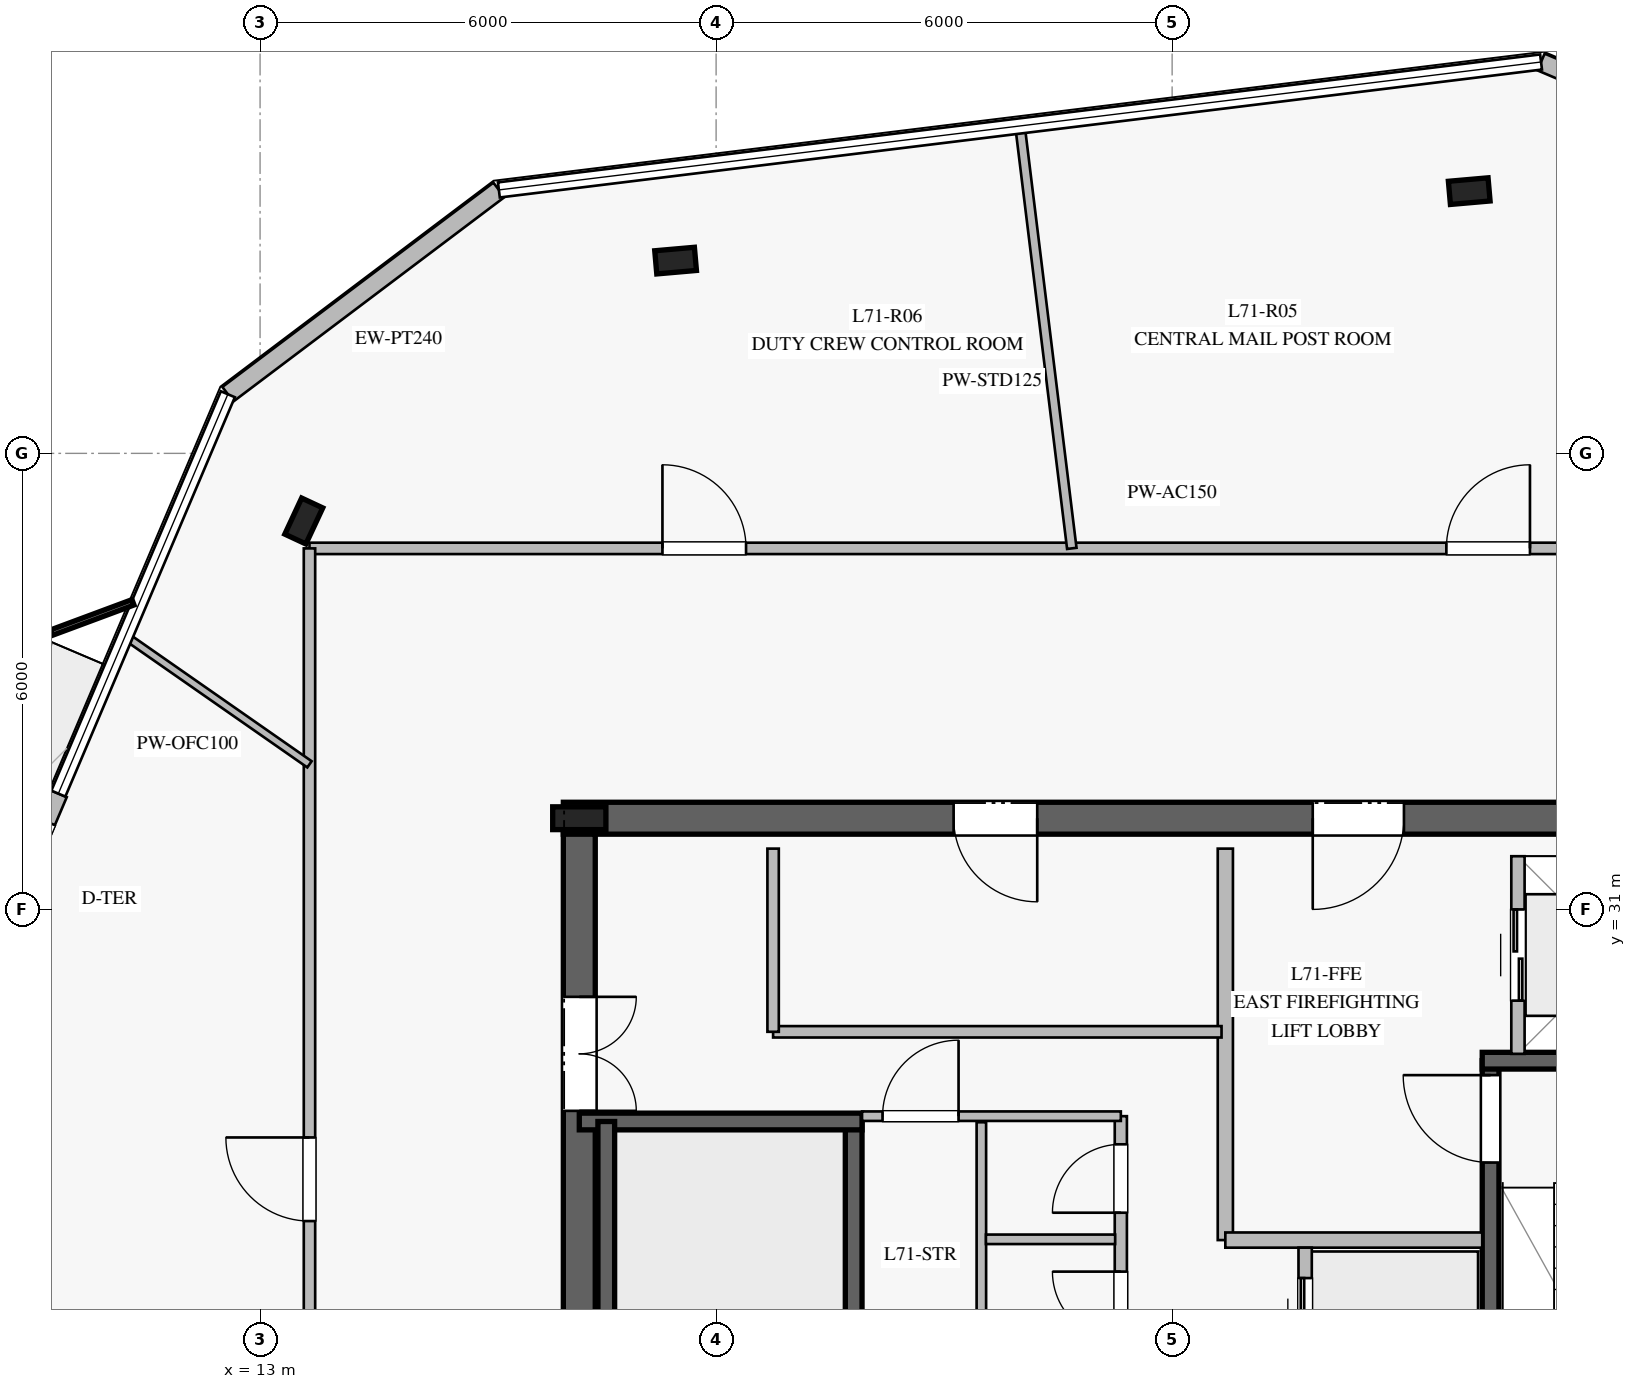
"""IFC4 building model, lengths in metres.
Left out: names, types, materials, properties, quantities, classifications, styles, units other than length and angle.
Written with IfcOpenShell. Run it as: python <this file> out.ifc"""

import sys

from ifc_helpers import new_model, si_unit, direction, frame, frame_2d, origin, origin_2d, place, context, subcontext, project, spatial, rectangle, i_section, extrude, element, fill, save


model = new_model("IFC4")
c1 = context("Model", 3, precision=1e-05, world=origin(), true_north=direction((0.0, 1.0)))
c2 = subcontext(c1, "Body", "Model", "MODEL_VIEW")
j1 = project(units=[si_unit("LENGTHUNIT", "METRE"), si_unit("PLANEANGLEUNIT", "RADIAN")], contexts=[c1])
p1 = place(None, origin())
s1 = spatial("IfcSite", under=j1, at=p1, CompositionType="ELEMENT")
p2 = place(p1, origin())
s2 = spatial("IfcBuilding", under=s1, at=p2, CompositionType="ELEMENT")
p3 = place(p2, frame((0.0, 0.0, 294.2)))
s3 = spatial("IfcBuildingStorey", under=s2, at=p3, CompositionType="ELEMENT", Elevation=294.2)
p4 = place(p3, frame((33.01, 32.2, 0.0), z_axis=(0.0, 0.0, 1.0), x_axis=(-1.0, 0.0, 0.0)))
e1 = element("IfcWall", 1, at=p4, inside=s3, PredefinedType="SHEAR", context=c2, shape_type="SweptSolid", body=[
    extrude(rectangle(XDim=16.02, YDim=0.42, at=frame_2d((8.01, 0.0))), origin(), (0.0, 0.0, 1.0), 3.78),
])
p5 = place(p4, frame((4.96, 0.0, 0.0)))
e2 = element("IfcOpeningElement", 2, at=p5, cuts=e1, PredefinedType="OPENING", context=c2, shape_type="SweptSolid", body=[
    extrude(rectangle(XDim=1.2, YDim=2.25, at=frame_2d((0.6, 1.125))), frame((0.0, 0.22, 0.0), z_axis=(0.0, -1.0, 0.0), x_axis=(1.0, 0.0, 0.0)), (0.0, 0.0, 1.0), 0.44),
])
p6 = place(p4, frame((9.785, 0.0, 0.0)))
e3 = element("IfcOpeningElement", 3, at=p6, cuts=e1, PredefinedType="OPENING", context=c2, shape_type="SweptSolid", body=[
    extrude(rectangle(XDim=1.1, YDim=2.2, at=frame_2d((0.55, 1.1))), frame((0.0, 0.22, 0.0), z_axis=(0.0, -1.0, 0.0), x_axis=(1.0, 0.0, 0.0)), (0.0, 0.0, 1.0), 0.44),
])
p7 = place(p3, frame((17.2, 31.99, 0.0), z_axis=(0.0, 0.0, 1.0), x_axis=(0.0, -1.0, 0.0)))
e4 = element("IfcWall", 4, at=p7, inside=s3, PredefinedType="SHEAR", context=c2, shape_type="SweptSolid", body=[
    extrude(rectangle(XDim=13.98, YDim=0.42, at=frame_2d((6.99, 0.0))), origin(), (0.0, 0.0, 1.0), 3.78),
])
p8 = place(p7, frame((2.14, 0.0, 0.0)))
e5 = element("IfcOpeningElement", 5, at=p8, cuts=e4, PredefinedType="OPENING", context=c2, shape_type="SweptSolid", body=[
    extrude(rectangle(XDim=1.5, YDim=2.2, at=frame_2d((0.75, 1.1))), frame((0.0, 0.22, 0.0), z_axis=(0.0, -1.0, 0.0), x_axis=(1.0, 0.0, 0.0)), (0.0, 0.0, 1.0), 0.44),
])
p9 = place(p3, frame((17.2, 32.2, 0.0), z_axis=(0.0, 0.0, 1.0), x_axis=(1.0, 0.0, 0.0)))
e6 = element("IfcColumn", 6, at=p9, inside=s3, PredefinedType="COLUMN", context=c2, shape_type="SweptSolid", body=[
    extrude(i_section(OverallWidth=0.3, OverallDepth=0.7, WebThickness=0.017, FlangeThickness=0.032, at=origin_2d()), origin(), (0.0, 0.0, 1.0), 4.0),
])
p10 = place(p3, frame((20.81, 20.99, 0.0), z_axis=(0.0, 0.0, 1.0), x_axis=(0.0, 1.0, 0.0)))
e7 = element("IfcWall", 7, at=p10, inside=s3, PredefinedType="SOLIDWALL", context=c2, shape_type="SweptSolid", body=[
    extrude(rectangle(XDim=7.22, YDim=0.22, at=frame_2d((3.61, 0.0))), origin(), (0.0, 0.0, 1.0), 3.78),
])
p11 = place(p10, frame((0.18, 0.0, 0.0)))
e8 = element("IfcOpeningElement", 8, at=p11, cuts=e7, PredefinedType="OPENING", context=c2, shape_type="SweptSolid", body=[
    extrude(rectangle(XDim=1.15, YDim=2.2, at=frame_2d((0.575, 1.1))), frame((0.0, 0.12, 0.0), z_axis=(0.0, -1.0, 0.0), x_axis=(1.0, 0.0, 0.0)), (0.0, 0.0, 1.0), 0.24),
])
p12 = place(p3, frame((17.2, 28.21, 0.0), z_axis=(0.0, 0.0, 1.0), x_axis=(1.0, 0.0, 0.0)))
e9 = element("IfcWall", 9, at=p12, inside=s3, PredefinedType="SOLIDWALL", context=c2, shape_type="SweptSolid", body=[
    extrude(rectangle(XDim=3.72, YDim=0.22, at=frame_2d((1.86, 0.0))), origin(), (0.0, 0.0, 1.0), 3.78),
])
p13 = place(p3, frame((17.555, 28.21, 0.0), z_axis=(0.0, 0.0, 1.0), x_axis=(0.0, -1.0, 0.0)))
e10 = element("IfcWall", 10, at=p13, inside=s3, PredefinedType="SOLIDWALL", context=c2, shape_type="SweptSolid", body=[
    extrude(rectangle(XDim=7.22, YDim=0.22, at=frame_2d((3.61, 0.0))), origin(), (0.0, 0.0, 1.0), 3.78),
])
p14 = place(p3, frame((29.19, 21.79, 0.0), z_axis=(0.0, 0.0, 1.0), x_axis=(0.0, 1.0, 0.0)))
e11 = element("IfcWall", 11, at=p14, inside=s3, PredefinedType="SOLIDWALL", context=c2, shape_type="SweptSolid", body=[
    extrude(rectangle(XDim=7.22, YDim=0.22, at=frame_2d((3.61, 0.0))), origin(), (0.0, 0.0, 1.0), 3.78),
])
p15 = place(p14, frame((5.88, 0.0, 0.0)))
e12 = element("IfcOpeningElement", 12, at=p15, cuts=e11, PredefinedType="OPENING", context=c2, shape_type="SweptSolid", body=[
    extrude(rectangle(XDim=1.15, YDim=2.2, at=frame_2d((0.575, 1.1))), frame((0.0, 0.12, 0.0), z_axis=(0.0, -1.0, 0.0), x_axis=(1.0, 0.0, 0.0)), (0.0, 0.0, 1.0), 0.24),
])
p16 = place(p3, frame((29.08, 29.01, 0.0), z_axis=(0.0, 0.0, 1.0), x_axis=(1.0, 0.0, 0.0)))
e13 = element("IfcWall", 13, at=p16, inside=s3, PredefinedType="SOLIDWALL", context=c2, shape_type="SweptSolid", body=[
    extrude(rectangle(XDim=3.72, YDim=0.22, at=frame_2d((1.86, 0.0))), origin(), (0.0, 0.0, 1.0), 3.78),
])
for number, where, z_axis, x_axis in (
    (14, (28.909, 40.45, 0.0), (0.0, 0.0, 1.0), (0.996, 0.087, 0.0)),
    (15, (18.467, 39.536, 0.0), (0.0, 0.0, 1.0), (0.996, 0.087, 0.0)),
    (16, (13.575, 36.11, 0.0), (0.0, 0.0, 1.0), (0.423, 0.906, 0.0)),
):
    element("IfcColumn", number, at=place(p3, frame(where, z_axis=z_axis, x_axis=x_axis)), inside=s3, PredefinedType="COLUMN", context=c2, shape_type="SweptSolid", body=[
        extrude(i_section(OverallWidth=0.306, OverallDepth=0.524, WebThickness=0.021, FlangeThickness=0.04, at=origin_2d()), origin(), (0.0, 0.0, 1.0), 4.0),
    ])
p17 = place(p3, frame((16.142, 40.466, 0.0), z_axis=(0.0, 0.0, 1.0), x_axis=(-0.798560985543, -0.601913907772, 0.0)))
e17 = element("IfcWall", 17, at=p17, inside=s3, PredefinedType="STANDARD", context=c2, shape_type="SweptSolid", body=[
    extrude(rectangle(XDim=4.466, YDim=0.24, at=frame_2d((2.233, 0.0))), origin(), (0.0, 0.0, 1.0), 3.78),
])
p18 = place(p3, frame((10.346, 32.524, 0.0), z_axis=(0.0, 0.0, 1.0), x_axis=(-0.390847654615, -0.920455382342, 0.0)))
e18 = element("IfcWall", 18, at=p18, inside=s3, PredefinedType="STANDARD", context=c2, shape_type="SweptSolid", body=[
    extrude(rectangle(XDim=2.4, YDim=0.24, at=frame_2d((1.2, 0.0))), origin(), (0.0, 0.0, 1.0), 3.78),
])
p19 = place(p18, frame((0.4, 0.0, 0.0)))
e19 = element("IfcOpeningElement", 19, at=p19, cuts=e18, PredefinedType="OPENING", context=c2, shape_type="SweptSolid", body=[
    extrude(rectangle(XDim=1.6, YDim=2.25, at=frame_2d((0.8, 1.125))), frame((0.0, 0.13, 0.0), z_axis=(0.0, -1.0, 0.0), x_axis=(1.0, 0.0, 0.0)), (0.0, 0.0, 1.0), 0.26),
])
p20 = place(p3, frame((33.964, 40.404, 0.0), z_axis=(0.0, 0.0, 1.0), x_axis=(-0.92048584613, 0.390775903908, 0.0)))
e20 = element("IfcWall", 20, at=p20, inside=s3, PredefinedType="STANDARD", context=c2, shape_type="SweptSolid", body=[
    extrude(rectangle(XDim=4.465, YDim=0.24, at=frame_2d((2.232, 0.0))), origin(), (0.0, 0.0, 1.0), 3.78),
])
p21 = place(p3, frame((25.7, 26.65, 0.0), z_axis=(0.0, 0.0, 1.0), x_axis=(0.0, 1.0, 0.0)))
e21 = element("IfcWall", 21, at=p21, inside=s3, PredefinedType="PARTITIONING", context=c2, shape_type="SweptSolid", body=[
    extrude(rectangle(XDim=5.15, YDim=0.2, at=frame_2d((2.575, 0.0))), origin(), (0.0, 0.0, 1.0), 3.78),
])
p22 = place(p3, frame((25.7, 26.65, 0.0), z_axis=(0.0, 0.0, 1.0), x_axis=(1.0, 0.0, 0.0)))
e22 = element("IfcWall", 22, at=p22, inside=s3, PredefinedType="PARTITIONING", context=c2, shape_type="SweptSolid", body=[
    extrude(rectangle(XDim=3.38, YDim=0.2, at=frame_2d((1.69, 0.0))), origin(), (0.0, 0.0, 1.0), 3.78),
])
p23 = place(p3, frame((24.325, 23.35, 0.0), z_axis=(0.0, 0.0, 1.0), x_axis=(0.0, 1.0, 0.0)))
e23 = element("IfcWall", 23, at=p23, inside=s3, PredefinedType="PLUMBINGWALL", context=c2, shape_type="SweptSolid", body=[
    extrude(rectangle(XDim=4.93, YDim=0.16, at=frame_2d((2.465, 0.0))), origin(), (0.0, 0.0, 1.0), 3.78),
])
p24 = place(p23, frame((0.325, 0.0, 0.0)))
e24 = element("IfcOpeningElement", 24, at=p24, cuts=e23, PredefinedType="OPENING", context=c2, shape_type="SweptSolid", body=[
    extrude(rectangle(XDim=0.95, YDim=2.1, at=frame_2d((0.475, 1.05))), frame((0.0, 0.09, 0.0), z_axis=(0.0, -1.0, 0.0), x_axis=(1.0, 0.0, 0.0)), (0.0, 0.0, 1.0), 0.18),
])
p25 = place(p23, frame((1.985, 0.0, 0.0)))
e25 = element("IfcOpeningElement", 25, at=p25, cuts=e23, PredefinedType="OPENING", context=c2, shape_type="SweptSolid", body=[
    extrude(rectangle(XDim=0.9, YDim=2.1, at=frame_2d((0.45, 1.05))), frame((0.0, 0.09, 0.0), z_axis=(0.0, -1.0, 0.0), x_axis=(1.0, 0.0, 0.0)), (0.0, 0.0, 1.0), 0.18),
])
p26 = place(p23, frame((3.66, 0.0, 0.0)))
e26 = element("IfcOpeningElement", 26, at=p26, cuts=e23, PredefinedType="OPENING", context=c2, shape_type="SweptSolid", body=[
    extrude(rectangle(XDim=0.9, YDim=2.1, at=frame_2d((0.45, 1.05))), frame((0.0, 0.09, 0.0), z_axis=(0.0, -1.0, 0.0), x_axis=(1.0, 0.0, 0.0)), (0.0, 0.0, 1.0), 0.18),
])
p27 = place(p3, frame((20.92, 28.28, 0.0), z_axis=(0.0, 0.0, 1.0), x_axis=(1.0, 0.0, 0.0)))
e27 = element("IfcWall", 27, at=p27, inside=s3, PredefinedType="PARTITIONING", context=c2, shape_type="SweptSolid", body=[
    extrude(rectangle(XDim=3.405, YDim=0.125, at=frame_2d((1.703, 0.0))), origin(), (0.0, 0.0, 1.0), 3.78),
])
p28 = place(p27, frame((0.27, 0.0, 0.0)))
e28 = element("IfcOpeningElement", 28, at=p28, cuts=e27, PredefinedType="OPENING", context=c2, shape_type="SweptSolid", body=[
    extrude(rectangle(XDim=1.0, YDim=2.15, at=frame_2d((0.5, 1.075))), frame((0.0, 0.073, 0.0), z_axis=(0.0, -1.0, 0.0), x_axis=(1.0, 0.0, 0.0)), (0.0, 0.0, 1.0), 0.145),
])
p29 = place(p3, frame((22.49, 24.97, 0.0), z_axis=(0.0, 0.0, 1.0), x_axis=(0.0, 1.0, 0.0)))
e29 = element("IfcWall", 29, at=p29, inside=s3, PredefinedType="PARTITIONING", context=c2, shape_type="SweptSolid", body=[
    extrude(rectangle(XDim=3.23, YDim=0.125, at=frame_2d((1.615, 0.0))), origin(), (0.0, 0.0, 1.0), 3.78),
])
p30 = place(p3, frame((22.55, 26.66, 0.0), z_axis=(0.0, 0.0, 1.0), x_axis=(1.0, 0.0, 0.0)))
e30 = element("IfcWall", 30, at=p30, inside=s3, PredefinedType="PARTITIONING", context=c2, shape_type="SweptSolid", body=[
    extrude(rectangle(XDim=1.7, YDim=0.125, at=frame_2d((0.85, 0.0))), origin(), (0.0, 0.0, 1.0), 3.78),
])
p31 = place(p3, frame((19.75, 29.39, 0.0), z_axis=(0.0, 0.0, 1.0), x_axis=(1.0, 0.0, 0.0)))
e31 = element("IfcWall", 31, at=p31, inside=s3, PredefinedType="PARTITIONING", context=c2, shape_type="SweptSolid", body=[
    extrude(rectangle(XDim=5.9, YDim=0.15, at=frame_2d((2.95, 0.0))), origin(), (0.0, 0.0, 1.0), 3.78),
])
p32 = place(p3, frame((19.75, 29.39, 0.0), z_axis=(0.0, 0.0, 1.0), x_axis=(0.0, 1.0, 0.0)))
e32 = element("IfcWall", 32, at=p32, inside=s3, PredefinedType="PARTITIONING", context=c2, shape_type="SweptSolid", body=[
    extrude(rectangle(XDim=2.41, YDim=0.15, at=frame_2d((1.205, 0.0))), origin(), (0.0, 0.0, 1.0), 3.78),
])
p33 = place(p3, frame((26.75, 24.65, 0.0), z_axis=(0.0, 0.0, 1.0), x_axis=(0.0, 1.0, 0.0)))
e33 = element("IfcWall", 33, at=p33, inside=s3, PredefinedType="PARTITIONING", context=c2, shape_type="SweptSolid", body=[
    extrude(rectangle(XDim=1.9, YDim=0.175, at=frame_2d((0.95, 0.0))), origin(), (0.0, 0.0, 1.0), 3.78),
])
p34 = place(p33, frame((0.4, 0.0, 0.0)))
e34 = element("IfcOpeningElement", 34, at=p34, cuts=e33, PredefinedType="OPENING", context=c2, shape_type="SweptSolid", body=[
    extrude(rectangle(XDim=1.1, YDim=2.2, at=frame_2d((0.55, 1.1))), frame((0.0, 0.098, 0.0), z_axis=(0.0, -1.0, 0.0), x_axis=(1.0, 0.0, 0.0)), (0.0, 0.0, 1.0), 0.195),
])
p35 = place(p3, frame((29.55, 29.1, 0.0), z_axis=(0.0, 0.0, 1.0), x_axis=(0.0, 1.0, 0.0)))
e35 = element("IfcWall", 35, at=p35, inside=s3, PredefinedType="PARTITIONING", context=c2, shape_type="SweptSolid", body=[
    extrude(rectangle(XDim=2.6, YDim=0.175, at=frame_2d((1.3, 0.0))), origin(), (0.0, 0.0, 1.0), 3.78),
])
p36 = place(p35, frame((0.7, 0.0, 0.0)))
e36 = element("IfcOpeningElement", 36, at=p36, cuts=e35, PredefinedType="OPENING", context=c2, shape_type="SweptSolid", body=[
    extrude(rectangle(XDim=1.2, YDim=2.2, at=frame_2d((0.6, 1.1))), frame((0.0, 0.098, 0.0), z_axis=(0.0, -1.0, 0.0), x_axis=(1.0, 0.0, 0.0)), (0.0, 0.0, 1.0), 0.195),
])
p37 = place(p3, frame((13.65, 35.75, 0.0), z_axis=(0.0, 0.0, 1.0), x_axis=(1.0, 0.0, 0.0)))
e37 = element("IfcWall", 37, at=p37, inside=s3, PredefinedType="PARTITIONING", context=c2, shape_type="SweptSolid", body=[
    extrude(rectangle(XDim=22.7, YDim=0.15, at=frame_2d((11.35, 0.0))), origin(), (0.0, 0.0, 1.0), 3.02),
])
p38 = place(p37, frame((14.958, 0.0, 0.0)))
e38 = element("IfcOpeningElement", 38, at=p38, cuts=e37, PredefinedType="OPENING", context=c2, shape_type="SweptSolid", body=[
    extrude(rectangle(XDim=1.1, YDim=2.2, at=frame_2d((0.55, 1.1))), frame((0.0, 0.085, 0.0), z_axis=(0.0, -1.0, 0.0), x_axis=(1.0, 0.0, 0.0)), (0.0, 0.0, 1.0), 0.17),
])
p39 = place(p37, frame((4.644, 0.0, 0.0)))
e39 = element("IfcOpeningElement", 39, at=p39, cuts=e37, PredefinedType="OPENING", context=c2, shape_type="SweptSolid", body=[
    extrude(rectangle(XDim=1.1, YDim=2.2, at=frame_2d((0.55, 1.1))), frame((0.0, 0.085, 0.0), z_axis=(0.0, -1.0, 0.0), x_axis=(1.0, 0.0, 0.0)), (0.0, 0.0, 1.0), 0.17),
])
p40 = place(p3, frame((13.65, 14.25, 0.0), z_axis=(0.0, 0.0, 1.0), x_axis=(0.0, 1.0, 0.0)))
e40 = element("IfcWall", 40, at=p40, inside=s3, PredefinedType="PARTITIONING", context=c2, shape_type="SweptSolid", body=[
    extrude(rectangle(XDim=21.5, YDim=0.15, at=frame_2d((10.75, 0.0))), origin(), (0.0, 0.0, 1.0), 3.05),
])
p41 = place(p40, frame((12.65, 0.0, 0.0)))
e41 = element("IfcOpeningElement", 41, at=p41, cuts=e40, PredefinedType="OPENING", context=c2, shape_type="SweptSolid", body=[
    extrude(rectangle(XDim=1.1, YDim=2.2, at=frame_2d((0.55, 1.1))), frame((0.0, 0.085, 0.0), z_axis=(0.0, -1.0, 0.0), x_axis=(1.0, 0.0, 0.0)), (0.0, 0.0, 1.0), 0.17),
])
p42 = place(p3, frame((23.68, 35.75, 0.0), z_axis=(0.0, 0.0, 1.0), x_axis=(-0.121774165896, 0.992557833338, 0.0)))
e42 = element("IfcWall", 42, at=p42, inside=s3, PredefinedType="PARTITIONING", context=c2, shape_type="SweptSolid", body=[
    extrude(rectangle(XDim=5.583, YDim=0.125, at=frame_2d((2.792, 0.0))), origin(), (0.0, 0.0, 1.0), 3.02),
])
p43 = place(p3, frame((13.65, 32.909, 0.0), z_axis=(0.0, 0.0, 1.0), x_axis=(-0.820311921153, 0.57191638551, 0.0)))
e43 = element("IfcWall", 43, at=p43, inside=s3, PredefinedType="MOVABLE", context=c2, shape_type="SweptSolid", body=[
    extrude(rectangle(XDim=2.938, YDim=0.1, at=frame_2d((1.469, 0.0))), origin(), (0.0, 0.0, 1.0), 3.28),
])
p44 = place(p15, origin())
e44 = element("IfcDoor", 44, at=p44, inside=s3, OperationType="SINGLE_SWING_RIGHT", PredefinedType="DOOR", context=c2, shape_type="SweptSolid", body=[
    extrude(rectangle(XDim=1.15, YDim=2.2, at=frame_2d((0.575, 1.1))), frame((0.0, 0.025, 0.0), z_axis=(0.0, -1.0, 0.0), x_axis=(1.0, 0.0, 0.0)), (0.0, 0.0, 1.0), 0.05),
])
fill(e12, e44)
p45 = place(p5, origin())
e45 = element("IfcDoor", 45, at=p45, inside=s3, OperationType="SINGLE_SWING_RIGHT", PredefinedType="DOOR", context=c2, shape_type="SweptSolid", body=[
    extrude(rectangle(XDim=1.2, YDim=2.25, at=frame_2d((0.6, 1.125))), frame((0.0, 0.025, 0.0), z_axis=(0.0, -1.0, 0.0), x_axis=(1.0, 0.0, 0.0)), (0.0, 0.0, 1.0), 0.05),
])
fill(e2, e45)
p46 = place(p8, origin())
e46 = element("IfcDoor", 46, at=p46, inside=s3, OperationType="DOUBLE_DOOR_SINGLE_SWING", PredefinedType="DOOR", context=c2, shape_type="SweptSolid", body=[
    extrude(rectangle(XDim=1.5, YDim=2.2, at=frame_2d((0.75, 1.1))), frame((0.0, 0.025, 0.0), z_axis=(0.0, -1.0, 0.0), x_axis=(1.0, 0.0, 0.0)), (0.0, 0.0, 1.0), 0.05),
])
fill(e5, e46)
p47 = place(p25, origin())
e47 = element("IfcDoor", 47, at=p47, inside=s3, OperationType="SINGLE_SWING_RIGHT", PredefinedType="DOOR", context=c2, shape_type="SweptSolid", body=[
    extrude(rectangle(XDim=0.9, YDim=2.1, at=frame_2d((0.45, 1.05))), frame((0.0, 0.025, 0.0), z_axis=(0.0, -1.0, 0.0), x_axis=(1.0, 0.0, 0.0)), (0.0, 0.0, 1.0), 0.05),
])
fill(e25, e47)
p48 = place(p26, origin())
e48 = element("IfcDoor", 48, at=p48, inside=s3, OperationType="SINGLE_SWING_LEFT", PredefinedType="DOOR", context=c2, shape_type="SweptSolid", body=[
    extrude(rectangle(XDim=0.9, YDim=2.1, at=frame_2d((0.45, 1.05))), frame((0.0, 0.025, 0.0), z_axis=(0.0, -1.0, 0.0), x_axis=(1.0, 0.0, 0.0)), (0.0, 0.0, 1.0), 0.05),
])
fill(e26, e48)
p49 = place(p28, origin())
e49 = element("IfcDoor", 49, at=p49, inside=s3, OperationType="SINGLE_SWING_RIGHT", PredefinedType="DOOR", context=c2, shape_type="SweptSolid", body=[
    extrude(rectangle(XDim=1.0, YDim=2.15, at=frame_2d((0.5, 1.075))), frame((0.0, 0.025, 0.0), z_axis=(0.0, -1.0, 0.0), x_axis=(1.0, 0.0, 0.0)), (0.0, 0.0, 1.0), 0.05),
])
fill(e28, e49)
p50 = place(p6, origin())
e50 = element("IfcDoor", 50, at=p50, inside=s3, OperationType="SINGLE_SWING_LEFT", PredefinedType="DOOR", context=c2, shape_type="SweptSolid", body=[
    extrude(rectangle(XDim=1.1, YDim=2.2, at=frame_2d((0.55, 1.1))), frame((0.0, 0.025, 0.0), z_axis=(0.0, -1.0, 0.0), x_axis=(1.0, 0.0, 0.0)), (0.0, 0.0, 1.0), 0.05),
])
fill(e3, e50)
p51 = place(p34, origin())
e51 = element("IfcDoor", 51, at=p51, inside=s3, OperationType="DOUBLE_DOOR_SLIDING", PredefinedType="DOOR", context=c2, shape_type="SweptSolid", body=[
    extrude(rectangle(XDim=1.1, YDim=2.2, at=frame_2d((0.55, 1.1))), frame((0.0, 0.025, 0.0), z_axis=(0.0, -1.0, 0.0), x_axis=(1.0, 0.0, 0.0)), (0.0, 0.0, 1.0), 0.05),
])
fill(e34, e51)
p52 = place(p36, origin())
e52 = element("IfcDoor", 52, at=p52, inside=s3, OperationType="DOUBLE_DOOR_SLIDING", PredefinedType="DOOR", context=c2, shape_type="SweptSolid", body=[
    extrude(rectangle(XDim=1.2, YDim=2.2, at=frame_2d((0.6, 1.1))), frame((0.0, 0.025, 0.0), z_axis=(0.0, -1.0, 0.0), x_axis=(1.0, 0.0, 0.0)), (0.0, 0.0, 1.0), 0.05),
])
fill(e36, e52)
p53 = place(p38, origin())
e53 = element("IfcDoor", 53, at=p53, inside=s3, OperationType="SINGLE_SWING_RIGHT", PredefinedType="DOOR", context=c2, shape_type="SweptSolid", body=[
    extrude(rectangle(XDim=1.1, YDim=2.2, at=frame_2d((0.55, 1.1))), frame((0.0, 0.025, 0.0), z_axis=(0.0, -1.0, 0.0), x_axis=(1.0, 0.0, 0.0)), (0.0, 0.0, 1.0), 0.05),
])
fill(e38, e53)
p54 = place(p39, origin())
e54 = element("IfcDoor", 54, at=p54, inside=s3, OperationType="SINGLE_SWING_LEFT", PredefinedType="DOOR", context=c2, shape_type="SweptSolid", body=[
    extrude(rectangle(XDim=1.1, YDim=2.2, at=frame_2d((0.55, 1.1))), frame((0.0, 0.025, 0.0), z_axis=(0.0, -1.0, 0.0), x_axis=(1.0, 0.0, 0.0)), (0.0, 0.0, 1.0), 0.05),
])
fill(e39, e54)
p55 = place(p41, origin())
e55 = element("IfcDoor", 55, at=p55, inside=s3, OperationType="SINGLE_SWING_RIGHT", PredefinedType="DOOR", context=c2, shape_type="SweptSolid", body=[
    extrude(rectangle(XDim=1.1, YDim=2.2, at=frame_2d((0.55, 1.1))), frame((0.0, 0.025, 0.0), z_axis=(0.0, -1.0, 0.0), x_axis=(1.0, 0.0, 0.0)), (0.0, 0.0, 1.0), 0.05),
])
fill(e41, e55)
save(model, sys.argv[1])
